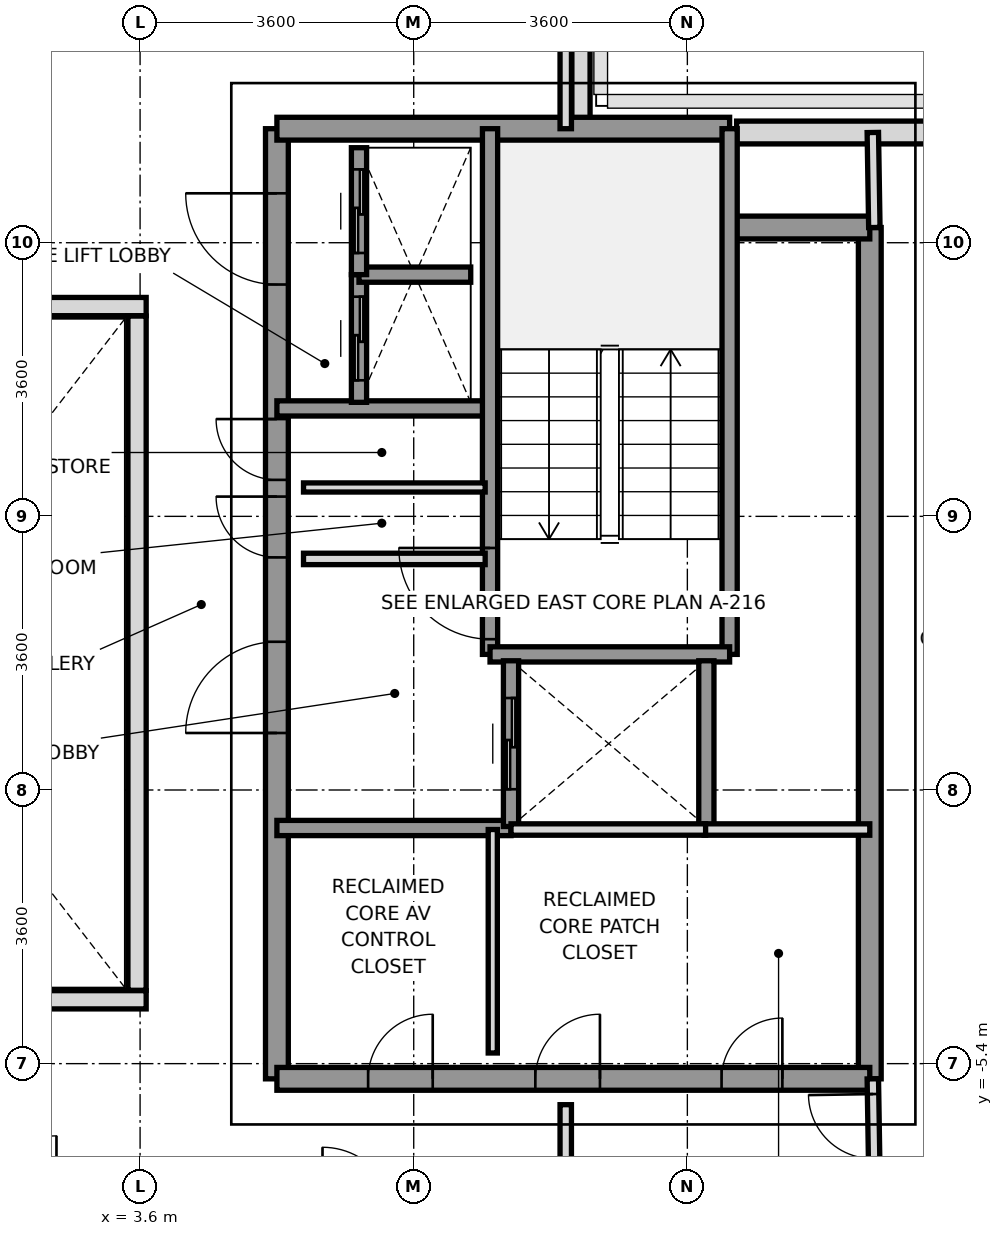
"""IFC4 building model, lengths in metres.
Left out: names, types, materials, properties, quantities, classifications, styles, units other than length and angle.
Written with IfcOpenShell. Run it as: python <this file> out.ifc"""

import sys

from ifc_helpers import new_model, si_unit, direction, frame, frame_2d, origin, place, context, subcontext, project, spatial, rectangle, extrude, source, transform, mapped, element, fill, save


model = new_model("IFC4")
c1 = context("Model", 3, precision=1e-05, world=origin(), true_north=direction((0.0, 1.0)))
c2 = subcontext(c1, "Body", "Model", "MODEL_VIEW")
j1 = project(units=[si_unit("LENGTHUNIT", "METRE"), si_unit("PLANEANGLEUNIT", "RADIAN")], contexts=[c1])
p1 = place(None, origin())
s1 = spatial("IfcSite", under=j1, at=p1, CompositionType="ELEMENT")
p2 = place(p1, origin())
s2 = spatial("IfcBuilding", under=s1, at=p2, CompositionType="ELEMENT")
p3 = place(p2, frame((0.0, 0.0, 223.6)))
s3 = spatial("IfcBuildingStorey", under=s2, at=p3, CompositionType="ELEMENT", Elevation=223.6)
p4 = place(p3, frame((11.448, 6.85, 0.0), z_axis=(0.0, 0.0, 1.0), x_axis=(1.0, 0.0, 0.0)))
e1 = element("IfcWall", 1, at=p4, inside=s3, PredefinedType="SOLIDWALL", context=c2, shape_type="SweptSolid", body=[
    extrude(rectangle(XDim=2.685, YDim=0.3, at=frame_2d((1.343, 0.0))), origin(), (0.0, 0.0, 1.0), 2.57),
])
p5 = place(p3, frame((9.4, 8.622, 0.0), z_axis=(0.0, 0.0, 1.0), x_axis=(0.0, -1.0, 0.0)))
e2 = element("IfcWall", 2, at=p5, inside=s3, PredefinedType="PARAPET", context=c2, shape_type="SweptSolid", body=[
    extrude(rectangle(XDim=1.669, YDim=0.24, at=frame_2d((0.834, 0.0))), origin(), (0.0, 0.0, 1.0), 1.15),
])
p6 = place(p3, frame((13.2, -5.6, 0.0), z_axis=(0.0, 0.0, 1.0), x_axis=(0.0, 1.0, 0.0)))
e3 = element("IfcWall", 3, at=p6, inside=s3, PredefinedType="SHEAR", context=c2, shape_type="SweptSolid", body=[
    extrude(rectangle(XDim=11.2, YDim=0.3, at=frame_2d((5.6, 0.0))), origin(), (0.0, 0.0, 1.0), 3.01),
])
p7 = place(p3, frame((5.4, -5.6, 0.0), z_axis=(0.0, 0.0, 1.0), x_axis=(0.0, 1.0, 0.0)))
e4 = element("IfcWall", 4, at=p7, inside=s3, PredefinedType="SHEAR", context=c2, shape_type="SweptSolid", body=[
    extrude(rectangle(XDim=12.5, YDim=0.3, at=frame_2d((6.25, 0.0))), origin(), (0.0, 0.0, 1.0), 3.01),
])
p8 = place(p7, frame((4.55, 0.0, 0.0)))
e5 = element("IfcOpeningElement", 5, at=p8, cuts=e4, PredefinedType="OPENING", context=c2, shape_type="SweptSolid", body=[
    extrude(rectangle(XDim=1.2, YDim=2.2, at=frame_2d((0.6, 1.1))), frame((0.0, 0.16, 0.0), z_axis=(0.0, -1.0, 0.0), x_axis=(1.0, 0.0, 0.0)), (0.0, 0.0, 1.0), 0.32),
])
p9 = place(p7, frame((10.45, 0.0, 0.0)))
e6 = element("IfcOpeningElement", 6, at=p9, cuts=e4, PredefinedType="OPENING", context=c2, shape_type="SweptSolid", body=[
    extrude(rectangle(XDim=1.2, YDim=2.2, at=frame_2d((0.6, 1.1))), frame((0.0, 0.16, 0.0), z_axis=(0.0, -1.0, 0.0), x_axis=(1.0, 0.0, 0.0)), (0.0, 0.0, 1.0), 0.32),
])
p10 = place(p7, frame((6.86, 0.0, 0.0)))
e7 = element("IfcOpeningElement", 7, at=p10, cuts=e4, PredefinedType="OPENING", context=c2, shape_type="SweptSolid", body=[
    extrude(rectangle(XDim=0.8, YDim=2.1, at=frame_2d((0.4, 1.05))), frame((0.0, 0.16, 0.0), z_axis=(0.0, -1.0, 0.0), x_axis=(1.0, 0.0, 0.0)), (0.0, 0.0, 1.0), 0.32),
])
p11 = place(p7, frame((7.88, 0.0, 0.0)))
e8 = element("IfcOpeningElement", 8, at=p11, cuts=e4, PredefinedType="OPENING", context=c2, shape_type="SweptSolid", body=[
    extrude(rectangle(XDim=0.8, YDim=2.1, at=frame_2d((0.4, 1.05))), frame((0.0, 0.16, 0.0), z_axis=(0.0, -1.0, 0.0), x_axis=(1.0, 0.0, 0.0)), (0.0, 0.0, 1.0), 0.32),
])
p12 = place(p3, frame((5.4, 6.9, 0.0), z_axis=(0.0, 0.0, 1.0), x_axis=(1.0, 0.0, 0.0)))
e9 = element("IfcWall", 9, at=p12, inside=s3, PredefinedType="SHEAR", context=c2, shape_type="SweptSolid", body=[
    extrude(rectangle(XDim=5.956, YDim=0.3, at=frame_2d((2.978, 0.0))), origin(), (0.0, 0.0, 1.0), 3.01),
])
p13 = place(p3, frame((11.356, 5.6, 0.0), z_axis=(0.0, 0.0, 1.0), x_axis=(1.0, 0.0, 0.0)))
e10 = element("IfcWall", 10, at=p13, inside=s3, PredefinedType="SHEAR", context=c2, shape_type="SweptSolid", body=[
    extrude(rectangle(XDim=1.844, YDim=0.3, at=frame_2d((0.922, 0.0))), origin(), (0.0, 0.0, 1.0), 3.01),
])
p14 = place(p3, frame((5.4, -5.6, 0.0), z_axis=(0.0, 0.0, 1.0), x_axis=(1.0, 0.0, 0.0)))
e11 = element("IfcWall", 11, at=p14, inside=s3, PredefinedType="SHEAR", context=c2, shape_type="SweptSolid", body=[
    extrude(rectangle(XDim=7.8, YDim=0.3, at=frame_2d((3.9, 0.0))), origin(), (0.0, 0.0, 1.0), 3.01),
])
p15 = place(p14, frame((5.85, 0.0, 0.0)))
e12 = element("IfcOpeningElement", 12, at=p15, cuts=e11, PredefinedType="OPENING", context=c2, shape_type="SweptSolid", body=[
    extrude(rectangle(XDim=0.8, YDim=2.1, at=frame_2d((0.4, 1.05))), frame((0.0, 0.16, 0.0), z_axis=(0.0, -1.0, 0.0), x_axis=(1.0, 0.0, 0.0)), (0.0, 0.0, 1.0), 0.32),
])
p16 = place(p14, frame((1.2, 0.0, 0.0)))
e13 = element("IfcOpeningElement", 13, at=p16, cuts=e11, PredefinedType="OPENING", context=c2, shape_type="SweptSolid", body=[
    extrude(rectangle(XDim=0.85, YDim=2.1, at=frame_2d((0.425, 1.05))), frame((0.0, 0.16, 0.0), z_axis=(0.0, -1.0, 0.0), x_axis=(1.0, 0.0, 0.0)), (0.0, 0.0, 1.0), 0.32),
])
p17 = place(p14, frame((3.4, 0.0, 0.0)))
e14 = element("IfcOpeningElement", 14, at=p17, cuts=e11, PredefinedType="OPENING", context=c2, shape_type="SweptSolid", body=[
    extrude(rectangle(XDim=0.85, YDim=2.1, at=frame_2d((0.425, 1.05))), frame((0.0, 0.16, 0.0), z_axis=(0.0, -1.0, 0.0), x_axis=(1.0, 0.0, 0.0)), (0.0, 0.0, 1.0), 0.32),
])
p18 = place(p3, frame((5.4, 3.22, 0.0), z_axis=(0.0, 0.0, 1.0), x_axis=(1.0, 0.0, 0.0)))
e15 = element("IfcWall", 15, at=p18, inside=s3, PredefinedType="SOLIDWALL", context=c2, shape_type="SweptSolid", body=[
    extrude(rectangle(XDim=2.78, YDim=0.2, at=frame_2d((1.39, 0.0))), origin(), (0.0, 0.0, 1.0), 3.01),
])
p19 = place(p3, frame((5.4, -2.3, 0.0), z_axis=(0.0, 0.0, 1.0), x_axis=(1.0, 0.0, 0.0)))
e16 = element("IfcWall", 16, at=p19, inside=s3, PredefinedType="SOLIDWALL", context=c2, shape_type="SweptSolid", body=[
    extrude(rectangle(XDim=3.08, YDim=0.2, at=frame_2d((1.54, 0.0))), origin(), (0.0, 0.0, 1.0), 3.01),
])
p20 = place(p3, frame((8.204, -0.016, 0.0), z_axis=(0.0, 0.0, 1.0), x_axis=(0.0, 1.0, 0.0)))
e17 = element("IfcWall", 17, at=p20, inside=s3, PredefinedType="SOLIDWALL", context=c2, shape_type="SweptSolid", body=[
    extrude(rectangle(XDim=6.916, YDim=0.2, at=frame_2d((3.458, 0.0))), origin(), (0.0, 0.0, 1.0), 3.01),
])
p21 = place(p20, frame((0.2, 0.0, 0.0)))
e18 = element("IfcOpeningElement", 18, at=p21, cuts=e17, PredefinedType="OPENING", context=c2, shape_type="SweptSolid", body=[
    extrude(rectangle(XDim=1.2, YDim=2.2, at=frame_2d((0.6, 1.1))), frame((0.0, 0.11, 0.0), z_axis=(0.0, -1.0, 0.0), x_axis=(1.0, 0.0, 0.0)), (0.0, 0.0, 1.0), 0.22),
])
p22 = place(p3, frame((11.356, -0.016, 0.0), z_axis=(0.0, 0.0, 1.0), x_axis=(0.0, 1.0, 0.0)))
e19 = element("IfcWall", 19, at=p22, inside=s3, PredefinedType="SOLIDWALL", context=c2, shape_type="SweptSolid", body=[
    extrude(rectangle(XDim=6.916, YDim=0.2, at=frame_2d((3.458, 0.0))), origin(), (0.0, 0.0, 1.0), 3.01),
])
p23 = place(p3, frame((8.204, -0.016, 0.0), z_axis=(0.0, 0.0, 1.0), x_axis=(1.0, 0.0, 0.0)))
e20 = element("IfcWall", 20, at=p23, inside=s3, PredefinedType="SOLIDWALL", context=c2, shape_type="SweptSolid", body=[
    extrude(rectangle(XDim=3.152, YDim=0.2, at=frame_2d((1.576, 0.0))), origin(), (0.0, 0.0, 1.0), 3.01),
])
p24 = place(p3, frame((8.48, -2.28, 0.0), z_axis=(0.0, 0.0, 1.0), x_axis=(0.0, 1.0, 0.0)))
e21 = element("IfcWall", 21, at=p24, inside=s3, PredefinedType="SOLIDWALL", context=c2, shape_type="SweptSolid", body=[
    extrude(rectangle(XDim=2.18, YDim=0.2, at=frame_2d((1.09, 0.0))), origin(), (0.0, 0.0, 1.0), 3.01),
])
p25 = place(p24, frame((0.49, 0.0, 0.0)))
e22 = element("IfcOpeningElement", 22, at=p25, cuts=e21, PredefinedType="OPENING", context=c2, shape_type="SweptSolid", body=[
    extrude(rectangle(XDim=1.2, YDim=2.2, at=frame_2d((0.6, 1.1))), frame((0.0, 0.11, 0.0), z_axis=(0.0, -1.0, 0.0), x_axis=(1.0, 0.0, 0.0)), (0.0, 0.0, 1.0), 0.22),
])
p26 = place(p3, frame((11.05, -2.28, 0.0), z_axis=(0.0, 0.0, 1.0), x_axis=(0.0, 1.0, 0.0)))
e23 = element("IfcWall", 23, at=p26, inside=s3, PredefinedType="SOLIDWALL", context=c2, shape_type="SweptSolid", body=[
    extrude(rectangle(XDim=2.18, YDim=0.2, at=frame_2d((1.09, 0.0))), origin(), (0.0, 0.0, 1.0), 3.01),
])
p27 = place(p3, frame((6.48, 3.3, 0.0), z_axis=(0.0, 0.0, 1.0), x_axis=(0.0, 1.0, 0.0)))
e24 = element("IfcWall", 24, at=p27, inside=s3, PredefinedType="SOLIDWALL", context=c2, shape_type="SweptSolid", body=[
    extrude(rectangle(XDim=1.68, YDim=0.2, at=frame_2d((0.84, 0.0))), origin(), (0.0, 0.0, 1.0), 3.01),
])
p28 = place(p27, frame((0.29, 0.0, 0.0)))
e25 = element("IfcOpeningElement", 25, at=p28, cuts=e24, PredefinedType="OPENING", context=c2, shape_type="SweptSolid", body=[
    extrude(rectangle(XDim=1.1, YDim=2.2, at=frame_2d((0.55, 1.1))), frame((0.0, 0.11, 0.0), z_axis=(0.0, -1.0, 0.0), x_axis=(1.0, 0.0, 0.0)), (0.0, 0.0, 1.0), 0.22),
])
p29 = place(p3, frame((6.48, 4.98, 0.0), z_axis=(0.0, 0.0, 1.0), x_axis=(1.0, 0.0, 0.0)))
e26 = element("IfcWall", 26, at=p29, inside=s3, PredefinedType="SOLIDWALL", context=c2, shape_type="SweptSolid", body=[
    extrude(rectangle(XDim=1.47, YDim=0.2, at=frame_2d((0.735, 0.0))), origin(), (0.0, 0.0, 1.0), 3.01),
])
p30 = place(p3, frame((6.48, 4.98, 0.0), z_axis=(0.0, 0.0, 1.0), x_axis=(0.0, 1.0, 0.0)))
e27 = element("IfcWall", 27, at=p30, inside=s3, PredefinedType="SOLIDWALL", context=c2, shape_type="SweptSolid", body=[
    extrude(rectangle(XDim=1.67, YDim=0.2, at=frame_2d((0.835, 0.0))), origin(), (0.0, 0.0, 1.0), 3.01),
])
p31 = place(p30, frame((0.285, 0.0, 0.0)))
e28 = element("IfcOpeningElement", 28, at=p31, cuts=e27, PredefinedType="OPENING", context=c2, shape_type="SweptSolid", body=[
    extrude(rectangle(XDim=1.1, YDim=2.2, at=frame_2d((0.55, 1.1))), frame((0.0, 0.11, 0.0), z_axis=(0.0, -1.0, 0.0), x_axis=(1.0, 0.0, 0.0)), (0.0, 0.0, 1.0), 0.22),
])
p32 = place(p3, frame((5.75, 1.24, 0.0), z_axis=(0.0, 0.0, 1.0), x_axis=(1.0, 0.0, 0.0)))
e29 = element("IfcWall", 29, at=p32, inside=s3, PredefinedType="PARTITIONING", context=c2, shape_type="SweptSolid", body=[
    extrude(rectangle(XDim=2.39, YDim=0.15, at=frame_2d((1.195, 0.0))), origin(), (0.0, 0.0, 1.0), 3.01),
])
p33 = place(p3, frame((5.75, 2.18, 0.0), z_axis=(0.0, 0.0, 1.0), x_axis=(1.0, 0.0, 0.0)))
e30 = element("IfcWall", 30, at=p33, inside=s3, PredefinedType="PARTITIONING", context=c2, shape_type="SweptSolid", body=[
    extrude(rectangle(XDim=2.39, YDim=0.12, at=frame_2d((1.195, 0.0))), origin(), (0.0, 0.0, 1.0), 3.01),
])
p34 = place(p3, frame((11.02, -2.32, 0.0), z_axis=(0.0, 0.0, 1.0), x_axis=(1.0, 0.0, 0.0)))
e31 = element("IfcWall", 31, at=p34, inside=s3, PredefinedType="PARTITIONING", context=c2, shape_type="SweptSolid", body=[
    extrude(rectangle(XDim=2.18, YDim=0.15, at=frame_2d((1.09, 0.0))), origin(), (0.0, 0.0, 1.0), 3.01),
])
p35 = place(p3, frame((8.24, -5.26, 0.0), z_axis=(0.0, 0.0, 1.0), x_axis=(0.0, 1.0, 0.0)))
e32 = element("IfcWall", 32, at=p35, inside=s3, PredefinedType="PARTITIONING", context=c2, shape_type="SweptSolid", body=[
    extrude(rectangle(XDim=2.94, YDim=0.12, at=frame_2d((1.47, 0.0))), origin(), (0.0, 0.0, 1.0), 3.01),
])
p36 = place(p3, frame((8.48, -2.32, 0.0), z_axis=(0.0, 0.0, 1.0), x_axis=(1.0, 0.0, 0.0)))
e33 = element("IfcWall", 33, at=p36, inside=s3, PredefinedType="PARTITIONING", context=c2, shape_type="SweptSolid", body=[
    extrude(rectangle(XDim=2.56, YDim=0.15, at=frame_2d((1.28, 0.0))), origin(), (0.0, 0.0, 1.0), 3.01),
])
p37 = place(p3, frame((9.2, 6.9, 0.0), z_axis=(0.0, 0.0, 1.0), x_axis=(0.0, 1.0, 0.0)))
e34 = element("IfcWall", 34, at=p37, inside=s3, PredefinedType="PARTITIONING", context=c2, shape_type="SweptSolid", body=[
    extrude(rectangle(XDim=3.38, YDim=0.15, at=frame_2d((1.69, 0.0))), origin(), (0.0, 0.0, 1.0), 2.61),
])
p38 = place(p3, frame((9.2, -10.28, 0.0), z_axis=(0.0, 0.0, 1.0), x_axis=(0.0, 1.0, 0.0)))
e35 = element("IfcWall", 35, at=p38, inside=s3, PredefinedType="PARTITIONING", context=c2, shape_type="SweptSolid", body=[
    extrude(rectangle(XDim=4.34, YDim=0.15, at=frame_2d((2.17, 0.0))), origin(), (0.0, 0.0, 1.0), 2.61),
])
p39 = place(p3, frame((13.26, 5.6, 0.0), z_axis=(0.0, 0.0, 1.0), x_axis=(-0.016013571389, 0.999871774545, 0.0)))
e36 = element("IfcWall", 36, at=p39, inside=s3, PredefinedType="PARTITIONING", context=c2, shape_type="SweptSolid", body=[
    extrude(rectangle(XDim=1.25, YDim=0.15, at=frame_2d((0.625, 0.0))), origin(), (0.0, 0.0, 1.0), 3.01),
])
p40 = place(p3, frame((13.26, -6.85, 0.0), z_axis=(0.0, 0.0, 1.0), x_axis=(-0.016013571389, 0.999871774545, 0.0)))
e37 = element("IfcWall", 37, at=p40, inside=s3, PredefinedType="PARTITIONING", context=c2, shape_type="SweptSolid", body=[
    extrude(rectangle(XDim=1.25, YDim=0.15, at=frame_2d((0.625, 0.0))), origin(), (0.0, 0.0, 1.0), 3.01),
])
p41 = place(p40, frame((0.2, 0.0, 0.0)))
e38 = element("IfcOpeningElement", 38, at=p41, cuts=e37, PredefinedType="OPENING", context=c2, shape_type="SweptSolid", body=[
    extrude(rectangle(XDim=0.85, YDim=2.1, at=frame_2d((0.425, 1.05))), frame((0.0, 0.085, 0.0), z_axis=(0.0, -1.0, 0.0), x_axis=(1.0, 0.0, 0.0)), (0.0, 0.0, 1.0), 0.17),
])
for number, where, z_axis, x_axis in (
    (39, (-3.68, -4.56, 0.0), (0.0, 0.0, 1.0), (1.0, 0.0, 0.0)),
    (40, (-3.68, 4.56, 0.0), (0.0, 0.0, 1.0), (1.0, 0.0, 0.0)),
):
    element("IfcWall", number, at=place(p3, frame(where, z_axis=z_axis, x_axis=x_axis)), inside=s3, PredefinedType="PARAPET", context=c2, shape_type="SweptSolid", body=[
        extrude(rectangle(XDim=7.36, YDim=0.24, at=frame_2d((3.68, 0.0))), origin(), (0.0, 0.0, 1.0), 1.15),
    ])
p42 = place(p3, frame((3.56, -4.435, 0.0), z_axis=(0.0, 0.0, 1.0), x_axis=(0.0, 1.0, 0.0)))
e41 = element("IfcWall", 41, at=p42, inside=s3, PredefinedType="PARAPET", context=c2, shape_type="SweptSolid", body=[
    extrude(rectangle(XDim=8.87, YDim=0.24, at=frame_2d((4.435, 0.0))), origin(), (0.0, 0.0, 1.0), 1.15),
])
m1 = source(origin(), c2, "Body", "SweptSolid", [
    extrude(rectangle(XDim=1.2, YDim=2.2, at=frame_2d((0.6, 1.1))), frame((0.0, 0.025, 0.0), z_axis=(0.0, -1.0, 0.0), x_axis=(1.0, 0.0, 0.0)), (0.0, 0.0, 1.0), 0.05),
])
p43 = place(p21, origin())
e42 = element("IfcDoor", 42, at=p43, inside=s3, OperationType="SINGLE_SWING_RIGHT", PredefinedType="DOOR", context=c2, shape_type="MappedRepresentation", body=[
    mapped(m1, transform((0.0, 0.0, 0.0), x_axis=(1.0, 0.0, 0.0), y_axis=(0.0, 1.0, 0.0), z_axis=(0.0, 0.0, 1.0), scale=1.0)),
])
fill(e18, e42)
p44 = place(p8, origin())
e43 = element("IfcDoor", 43, at=p44, inside=s3, OperationType="SINGLE_SWING_LEFT", PredefinedType="DOOR", context=c2, shape_type="MappedRepresentation", body=[
    mapped(m1, transform((0.0, 0.0, 0.0), x_axis=(1.0, 0.0, 0.0), y_axis=(0.0, 1.0, 0.0), z_axis=(0.0, 0.0, 1.0), scale=1.0)),
])
fill(e5, e43)
p45 = place(p9, origin())
e44 = element("IfcDoor", 44, at=p45, inside=s3, OperationType="SINGLE_SWING_RIGHT", PredefinedType="DOOR", context=c2, shape_type="MappedRepresentation", body=[
    mapped(m1, transform((0.0, 0.0, 0.0), x_axis=(1.0, 0.0, 0.0), y_axis=(0.0, 1.0, 0.0), z_axis=(0.0, 0.0, 1.0), scale=1.0)),
])
fill(e6, e44)
m2 = source(origin(), c2, "Body", "SweptSolid", [
    extrude(rectangle(XDim=0.8, YDim=2.1, at=frame_2d((0.4, 1.05))), frame((0.0, 0.025, 0.0), z_axis=(0.0, -1.0, 0.0), x_axis=(1.0, 0.0, 0.0)), (0.0, 0.0, 1.0), 0.05),
])
p46 = place(p10, origin())
e45 = element("IfcDoor", 45, at=p46, inside=s3, OperationType="SINGLE_SWING_RIGHT", PredefinedType="DOOR", context=c2, shape_type="MappedRepresentation", body=[
    mapped(m2, transform((0.0, 0.0, 0.0), x_axis=(1.0, 0.0, 0.0), y_axis=(0.0, 1.0, 0.0), z_axis=(0.0, 0.0, 1.0), scale=1.0)),
])
fill(e7, e45)
p47 = place(p11, origin())
e46 = element("IfcDoor", 46, at=p47, inside=s3, OperationType="SINGLE_SWING_RIGHT", PredefinedType="DOOR", context=c2, shape_type="MappedRepresentation", body=[
    mapped(m2, transform((0.0, 0.0, 0.0), x_axis=(1.0, 0.0, 0.0), y_axis=(0.0, 1.0, 0.0), z_axis=(0.0, 0.0, 1.0), scale=1.0)),
])
fill(e8, e46)
p48 = place(p15, origin())
e47 = element("IfcDoor", 47, at=p48, inside=s3, OperationType="SINGLE_SWING_RIGHT", PredefinedType="DOOR", context=c2, shape_type="MappedRepresentation", body=[
    mapped(m2, transform((0.0, 0.0, 0.0), x_axis=(1.0, 0.0, 0.0), y_axis=(0.0, 1.0, 0.0), z_axis=(0.0, 0.0, 1.0), scale=1.0)),
])
fill(e12, e47)
m3 = source(origin(), c2, "Body", "SweptSolid", [
    extrude(rectangle(XDim=0.85, YDim=2.1, at=frame_2d((0.425, 1.05))), frame((0.0, 0.025, 0.0), z_axis=(0.0, -1.0, 0.0), x_axis=(1.0, 0.0, 0.0)), (0.0, 0.0, 1.0), 0.05),
])
p49 = place(p16, origin())
e48 = element("IfcDoor", 48, at=p49, inside=s3, OperationType="SINGLE_SWING_RIGHT", PredefinedType="DOOR", context=c2, shape_type="MappedRepresentation", body=[
    mapped(m3, transform((0.0, 0.0, 0.0), x_axis=(1.0, 0.0, 0.0), y_axis=(0.0, 1.0, 0.0), z_axis=(0.0, 0.0, 1.0), scale=1.0)),
])
fill(e13, e48)
p50 = place(p17, origin())
e49 = element("IfcDoor", 49, at=p50, inside=s3, OperationType="SINGLE_SWING_RIGHT", PredefinedType="DOOR", context=c2, shape_type="MappedRepresentation", body=[
    mapped(m3, transform((0.0, 0.0, 0.0), x_axis=(1.0, 0.0, 0.0), y_axis=(0.0, 1.0, 0.0), z_axis=(0.0, 0.0, 1.0), scale=1.0)),
])
fill(e14, e49)
p51 = place(p25, origin())
e50 = element("IfcDoor", 50, at=p51, inside=s3, OperationType="SLIDING_TO_RIGHT", PredefinedType="DOOR", context=c2, shape_type="MappedRepresentation", body=[
    mapped(m1, transform((0.0, 0.0, 0.0), x_axis=(1.0, 0.0, 0.0), y_axis=(0.0, 1.0, 0.0), z_axis=(0.0, 0.0, 1.0), scale=1.0)),
])
fill(e22, e50)
m4 = source(origin(), c2, "Body", "SweptSolid", [
    extrude(rectangle(XDim=1.1, YDim=2.2, at=frame_2d((0.55, 1.1))), frame((0.0, 0.025, 0.0), z_axis=(0.0, -1.0, 0.0), x_axis=(1.0, 0.0, 0.0)), (0.0, 0.0, 1.0), 0.05),
])
p52 = place(p28, origin())
e51 = element("IfcDoor", 51, at=p52, inside=s3, OperationType="SLIDING_TO_LEFT", PredefinedType="DOOR", context=c2, shape_type="MappedRepresentation", body=[
    mapped(m4, transform((0.0, 0.0, 0.0), x_axis=(1.0, 0.0, 0.0), y_axis=(0.0, 1.0, 0.0), z_axis=(0.0, 0.0, 1.0), scale=1.0)),
])
fill(e25, e51)
p53 = place(p31, origin())
e52 = element("IfcDoor", 52, at=p53, inside=s3, OperationType="SLIDING_TO_LEFT", PredefinedType="DOOR", context=c2, shape_type="MappedRepresentation", body=[
    mapped(m4, transform((0.0, 0.0, 0.0), x_axis=(1.0, 0.0, 0.0), y_axis=(0.0, 1.0, 0.0), z_axis=(0.0, 0.0, 1.0), scale=1.0)),
])
fill(e28, e52)
p54 = place(p41, origin())
e53 = element("IfcDoor", 53, at=p54, inside=s3, OperationType="SINGLE_SWING_RIGHT", PredefinedType="DOOR", context=c2, shape_type="MappedRepresentation", body=[
    mapped(m3, transform((0.0, 0.0, 0.0), x_axis=(1.0, 0.0, 0.0), y_axis=(0.0, 1.0, 0.0), z_axis=(0.0, 0.0, 1.0), scale=1.0)),
])
fill(e38, e53)
save(model, sys.argv[1])
